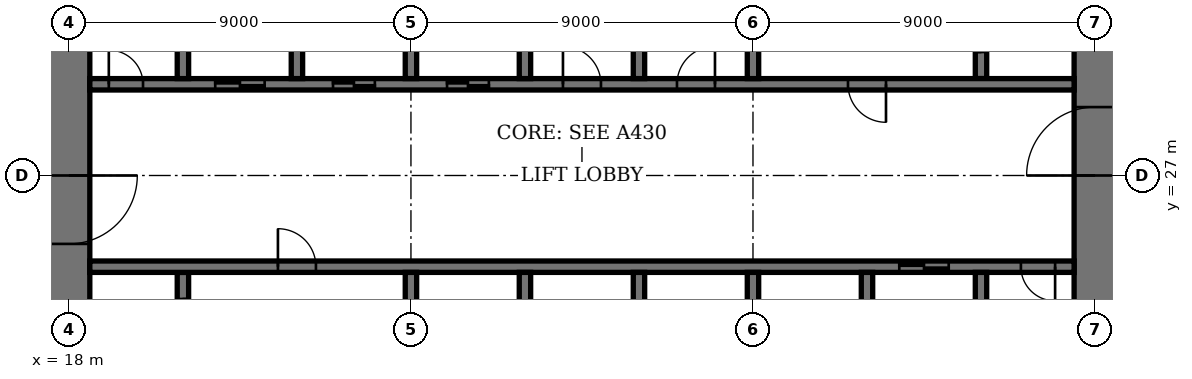
"""IFC4 building model, lengths in metres.
Left out: names, types, materials, properties, quantities, classifications, styles, units other than length and angle.
Written with IfcOpenShell. Run it as: python <this file> out.ifc"""

import sys

from ifc_helpers import new_model, si_unit, direction, frame, frame_2d, origin, place, context, subcontext, project, spatial, rectangle, extrude, element, fill, save


model = new_model("IFC4")
c1 = context("Model", 3, precision=1e-05, world=origin(), true_north=direction((0.0, 1.0)))
c2 = subcontext(c1, "Body", "Model", "MODEL_VIEW")
j1 = project(units=[si_unit("LENGTHUNIT", "METRE"), si_unit("PLANEANGLEUNIT", "RADIAN")], contexts=[c1])
p1 = place(None, origin())
s1 = spatial("IfcSite", under=j1, at=p1, CompositionType="ELEMENT")
p2 = place(p1, origin())
s2 = spatial("IfcBuilding", under=s1, at=p2, CompositionType="ELEMENT")
p3 = place(p2, frame((0.0, 0.0, 170.2)))
s3 = spatial("IfcBuildingStorey", under=s2, at=p3, CompositionType="ELEMENT", Elevation=170.2)
p4 = place(p3, frame((18.0, 35.45, 0.0), z_axis=(0.0, 0.0, 1.0), x_axis=(0.0, -1.0, 0.0)))
e1 = element("IfcWall", 1, at=p4, inside=s3, PredefinedType="SHEAR", context=c2, shape_type="SweptSolid", body=[
    extrude(rectangle(XDim=16.9, YDim=1.1, at=frame_2d((8.45, 0.0))), origin(), (0.0, 0.0, 1.0), 4.0),
])
p5 = place(p4, frame((8.45, 0.0, 0.0)))
e2 = element("IfcOpeningElement", 2, at=p5, cuts=e1, PredefinedType="OPENING", context=c2, shape_type="SweptSolid", body=[
    extrude(rectangle(XDim=1.8, YDim=2.4, at=frame_2d((0.9, 1.2))), frame((0.0, 0.56, 0.0), z_axis=(0.0, -1.0, 0.0), x_axis=(1.0, 0.0, 0.0)), (0.0, 0.0, 1.0), 1.12),
])
p6 = place(p3, frame((45.0, 18.55, 0.0), z_axis=(0.0, 0.0, 1.0), x_axis=(0.0, 1.0, 0.0)))
e3 = element("IfcWall", 3, at=p6, inside=s3, PredefinedType="SHEAR", context=c2, shape_type="SweptSolid", body=[
    extrude(rectangle(XDim=16.9, YDim=1.1, at=frame_2d((8.45, 0.0))), origin(), (0.0, 0.0, 1.0), 4.0),
])
p7 = place(p6, frame((8.45, 0.0, 0.0)))
e4 = element("IfcOpeningElement", 4, at=p7, cuts=e3, PredefinedType="OPENING", context=c2, shape_type="SweptSolid", body=[
    extrude(rectangle(XDim=1.8, YDim=2.4, at=frame_2d((0.9, 1.2))), frame((0.0, 0.56, 0.0), z_axis=(0.0, -1.0, 0.0), x_axis=(1.0, 0.0, 0.0)), (0.0, 0.0, 1.0), 1.12),
])
p8 = place(p3, frame((21.0, 21.95, 0.0), z_axis=(0.0, 0.0, 1.0), x_axis=(0.0, 1.0, 0.0)))
e5 = element("IfcWall", 5, at=p8, inside=s3, PredefinedType="SHEAR", context=c2, shape_type="SweptSolid", body=[
    extrude(rectangle(XDim=2.5, YDim=0.3, at=frame_2d((1.25, 0.0))), origin(), (0.0, 0.0, 1.0), 4.0),
])
p9 = place(p8, frame((0.7, 0.0, 0.0)))
e6 = element("IfcOpeningElement", 6, at=p9, cuts=e5, PredefinedType="OPENING", context=c2, shape_type="SweptSolid", body=[
    extrude(rectangle(XDim=1.1, YDim=2.4, at=frame_2d((0.55, 1.2))), frame((0.0, 0.16, 0.0), z_axis=(0.0, -1.0, 0.0), x_axis=(1.0, 0.0, 0.0)), (0.0, 0.0, 1.0), 0.32),
])
p10 = place(p3, frame((42.0, 29.55, 0.0), z_axis=(0.0, 0.0, 1.0), x_axis=(0.0, 1.0, 0.0)))
e7 = element("IfcWall", 7, at=p10, inside=s3, PredefinedType="SHEAR", context=c2, shape_type="SweptSolid", body=[
    extrude(rectangle(XDim=2.5, YDim=0.3, at=frame_2d((1.25, 0.0))), origin(), (0.0, 0.0, 1.0), 4.0),
])
p11 = place(p10, frame((0.7, 0.0, 0.0)))
e8 = element("IfcOpeningElement", 8, at=p11, cuts=e7, PredefinedType="OPENING", context=c2, shape_type="SweptSolid", body=[
    extrude(rectangle(XDim=1.1, YDim=2.4, at=frame_2d((0.55, 1.2))), frame((0.0, 0.16, 0.0), z_axis=(0.0, -1.0, 0.0), x_axis=(1.0, 0.0, 0.0)), (0.0, 0.0, 1.0), 0.32),
])
p12 = place(p3, frame((18.55, 24.6, 0.0), z_axis=(0.0, 0.0, 1.0), x_axis=(1.0, 0.0, 0.0)))
e9 = element("IfcWall", 9, at=p12, inside=s3, PredefinedType="SHEAR", context=c2, shape_type="SweptSolid", body=[
    extrude(rectangle(XDim=25.9, YDim=0.3, at=frame_2d((12.95, 0.0))), origin(), (0.0, 0.0, 1.0), 4.0),
])
p13 = place(p12, frame((4.95, 0.0, 0.0)))
e10 = element("IfcOpeningElement", 10, at=p13, cuts=e9, PredefinedType="OPENING", context=c2, shape_type="SweptSolid", body=[
    extrude(rectangle(XDim=1.0, YDim=2.4, at=frame_2d((0.5, 1.2))), frame((0.0, 0.16, 0.0), z_axis=(0.0, -1.0, 0.0), x_axis=(1.0, 0.0, 0.0)), (0.0, 0.0, 1.0), 0.32),
])
p14 = place(p12, frame((24.5, 0.0, 0.0)))
e11 = element("IfcOpeningElement", 11, at=p14, cuts=e9, PredefinedType="OPENING", context=c2, shape_type="SweptSolid", body=[
    extrude(rectangle(XDim=0.9, YDim=2.1, at=frame_2d((0.45, 1.05))), frame((0.0, 0.16, 0.0), z_axis=(0.0, -1.0, 0.0), x_axis=(1.0, 0.0, 0.0)), (0.0, 0.0, 1.0), 0.32),
])
p15 = place(p12, frame((21.3, 0.0, 0.0)))
e12 = element("IfcOpeningElement", 12, at=p15, cuts=e9, PredefinedType="OPENING", context=c2, shape_type="SweptSolid", body=[
    extrude(rectangle(XDim=1.3, YDim=2.4, at=frame_2d((0.65, 1.2))), frame((0.0, 0.16, 0.0), z_axis=(0.0, -1.0, 0.0), x_axis=(1.0, 0.0, 0.0)), (0.0, 0.0, 1.0), 0.32),
])
p16 = place(p3, frame((18.55, 29.4, 0.0), z_axis=(0.0, 0.0, 1.0), x_axis=(1.0, 0.0, 0.0)))
e13 = element("IfcWall", 13, at=p16, inside=s3, PredefinedType="SHEAR", context=c2, shape_type="SweptSolid", body=[
    extrude(rectangle(XDim=25.9, YDim=0.3, at=frame_2d((12.95, 0.0))), origin(), (0.0, 0.0, 1.0), 4.0),
])
p17 = place(p16, frame((19.95, 0.0, 0.0)))
e14 = element("IfcOpeningElement", 14, at=p17, cuts=e13, PredefinedType="OPENING", context=c2, shape_type="SweptSolid", body=[
    extrude(rectangle(XDim=1.0, YDim=2.4, at=frame_2d((0.5, 1.2))), frame((0.0, 0.16, 0.0), z_axis=(0.0, -1.0, 0.0), x_axis=(1.0, 0.0, 0.0)), (0.0, 0.0, 1.0), 0.32),
])
p18 = place(p16, frame((0.5, 0.0, 0.0)))
e15 = element("IfcOpeningElement", 15, at=p18, cuts=e13, PredefinedType="OPENING", context=c2, shape_type="SweptSolid", body=[
    extrude(rectangle(XDim=0.9, YDim=2.1, at=frame_2d((0.45, 1.05))), frame((0.0, 0.16, 0.0), z_axis=(0.0, -1.0, 0.0), x_axis=(1.0, 0.0, 0.0)), (0.0, 0.0, 1.0), 0.32),
])
p19 = place(p16, frame((15.45, 0.0, 0.0)))
e16 = element("IfcOpeningElement", 16, at=p19, cuts=e13, PredefinedType="OPENING", context=c2, shape_type="SweptSolid", body=[
    extrude(rectangle(XDim=1.0, YDim=2.4, at=frame_2d((0.5, 1.2))), frame((0.0, 0.16, 0.0), z_axis=(0.0, -1.0, 0.0), x_axis=(1.0, 0.0, 0.0)), (0.0, 0.0, 1.0), 0.32),
])
p20 = place(p16, frame((12.45, 0.0, 0.0)))
e17 = element("IfcOpeningElement", 17, at=p20, cuts=e13, PredefinedType="OPENING", context=c2, shape_type="SweptSolid", body=[
    extrude(rectangle(XDim=1.0, YDim=2.4, at=frame_2d((0.5, 1.2))), frame((0.0, 0.16, 0.0), z_axis=(0.0, -1.0, 0.0), x_axis=(1.0, 0.0, 0.0)), (0.0, 0.0, 1.0), 0.32),
])
p21 = place(p16, frame((9.4, 0.0, 0.0)))
e18 = element("IfcOpeningElement", 18, at=p21, cuts=e13, PredefinedType="OPENING", context=c2, shape_type="SweptSolid", body=[
    extrude(rectangle(XDim=1.1, YDim=2.4, at=frame_2d((0.55, 1.2))), frame((0.0, 0.16, 0.0), z_axis=(0.0, -1.0, 0.0), x_axis=(1.0, 0.0, 0.0)), (0.0, 0.0, 1.0), 0.32),
])
p22 = place(p16, frame((6.4, 0.0, 0.0)))
e19 = element("IfcOpeningElement", 19, at=p22, cuts=e13, PredefinedType="OPENING", context=c2, shape_type="SweptSolid", body=[
    extrude(rectangle(XDim=1.1, YDim=2.4, at=frame_2d((0.55, 1.2))), frame((0.0, 0.16, 0.0), z_axis=(0.0, -1.0, 0.0), x_axis=(1.0, 0.0, 0.0)), (0.0, 0.0, 1.0), 0.32),
])
p23 = place(p16, frame((3.3, 0.0, 0.0)))
e20 = element("IfcOpeningElement", 20, at=p23, cuts=e13, PredefinedType="OPENING", context=c2, shape_type="SweptSolid", body=[
    extrude(rectangle(XDim=1.3, YDim=2.4, at=frame_2d((0.65, 1.2))), frame((0.0, 0.16, 0.0), z_axis=(0.0, -1.0, 0.0), x_axis=(1.0, 0.0, 0.0)), (0.0, 0.0, 1.0), 0.32),
])
for number, where, z_axis, x_axis in (
    (21, (30.0, 21.75, 0.0), (0.0, 0.0, 1.0), (0.0, 1.0, 0.0)),
    (22, (33.0, 29.55, 0.0), (0.0, 0.0, 1.0), (0.0, 1.0, 0.0)),
    (23, (33.0, 21.75, 0.0), (0.0, 0.0, 1.0), (0.0, 1.0, 0.0)),
    (24, (30.0, 29.55, 0.0), (0.0, 0.0, 1.0), (0.0, 1.0, 0.0)),
    (25, (36.0, 21.75, 0.0), (0.0, 0.0, 1.0), (0.0, 1.0, 0.0)),
    (26, (27.0, 29.55, 0.0), (0.0, 0.0, 1.0), (0.0, 1.0, 0.0)),
):
    element("IfcWall", number, at=place(p3, frame(where, z_axis=z_axis, x_axis=x_axis)), inside=s3, PredefinedType="SHEAR", context=c2, shape_type="SweptSolid", body=[
        extrude(rectangle(XDim=2.7, YDim=0.3, at=frame_2d((1.35, 0.0))), origin(), (0.0, 0.0, 1.0), 4.0),
    ])
for number, where, z_axis, x_axis in (
    (27, (39.0, 18.55, 0.0), (0.0, 0.0, 1.0), (0.0, 1.0, 0.0)),
    (28, (24.0, 29.55, 0.0), (0.0, 0.0, 1.0), (0.0, 1.0, 0.0)),
):
    element("IfcWall", number, at=place(p3, frame(where, z_axis=z_axis, x_axis=x_axis)), inside=s3, PredefinedType="SHEAR", context=c2, shape_type="SweptSolid", body=[
        extrude(rectangle(XDim=5.9, YDim=0.3, at=frame_2d((2.95, 0.0))), origin(), (0.0, 0.0, 1.0), 4.0),
    ])
for number, where, z_axis, x_axis in (
    (29, (42.0, 21.75, 0.0), (0.0, 0.0, 1.0), (0.0, 1.0, 0.0)),
    (30, (21.0, 29.55, 0.0), (0.0, 0.0, 1.0), (0.0, 1.0, 0.0)),
):
    element("IfcWall", number, at=place(p3, frame(where, z_axis=z_axis, x_axis=x_axis)), inside=s3, PredefinedType="SHEAR", context=c2, shape_type="SweptSolid", body=[
        extrude(rectangle(XDim=2.7, YDim=0.3, at=frame_2d((1.35, 0.0))), origin(), (0.0, 0.0, 1.0), 4.0),
    ])
for number, where, z_axis, x_axis in (
    (31, (27.0, 21.6, 0.0), (0.0, 0.0, 1.0), (0.0, 1.0, 0.0)),
    (32, (36.0, 29.55, 0.0), (0.0, 0.0, 1.0), (0.0, 1.0, 0.0)),
):
    element("IfcWall", number, at=place(p3, frame(where, z_axis=z_axis, x_axis=x_axis)), inside=s3, PredefinedType="SHEAR", context=c2, shape_type="SweptSolid", body=[
        extrude(rectangle(XDim=2.85, YDim=0.3, at=frame_2d((1.425, 0.0))), origin(), (0.0, 0.0, 1.0), 4.0),
    ])
p24 = place(p5, origin())
e33 = element("IfcDoor", 33, at=p24, inside=s3, OperationType="DOUBLE_DOOR_DOUBLE_SWING", PredefinedType="DOOR", context=c2, shape_type="SweptSolid", body=[
    extrude(rectangle(XDim=1.8, YDim=2.4, at=frame_2d((0.9, 1.2))), frame((0.0, 0.03, 0.0), z_axis=(0.0, -1.0, 0.0), x_axis=(1.0, 0.0, 0.0)), (0.0, 0.0, 1.0), 0.06),
    extrude(rectangle(XDim=0.04, YDim=2.4, at=frame_2d((0.02, 1.2))), frame((0.0, 0.55, 0.0), z_axis=(0.0, -1.0, 0.0), x_axis=(1.0, 0.0, 0.0)), (0.0, 0.0, 1.0), 1.1),
    extrude(rectangle(XDim=0.04, YDim=2.4, at=frame_2d((1.78, 1.2))), frame((0.0, 0.55, 0.0), z_axis=(0.0, -1.0, 0.0), x_axis=(1.0, 0.0, 0.0)), (0.0, 0.0, 1.0), 1.1),
    extrude(rectangle(XDim=1.8, YDim=0.04, at=frame_2d((0.9, 2.38))), frame((0.0, 0.55, 0.0), z_axis=(0.0, -1.0, 0.0), x_axis=(1.0, 0.0, 0.0)), (0.0, 0.0, 1.0), 1.1),
])
fill(e2, e33)
p25 = place(p7, origin())
e34 = element("IfcDoor", 34, at=p25, inside=s3, OperationType="DOUBLE_DOOR_DOUBLE_SWING", PredefinedType="DOOR", context=c2, shape_type="SweptSolid", body=[
    extrude(rectangle(XDim=1.8, YDim=2.4, at=frame_2d((0.9, 1.2))), frame((0.0, 0.03, 0.0), z_axis=(0.0, -1.0, 0.0), x_axis=(1.0, 0.0, 0.0)), (0.0, 0.0, 1.0), 0.06),
    extrude(rectangle(XDim=0.04, YDim=2.4, at=frame_2d((0.02, 1.2))), frame((0.0, 0.55, 0.0), z_axis=(0.0, -1.0, 0.0), x_axis=(1.0, 0.0, 0.0)), (0.0, 0.0, 1.0), 1.1),
    extrude(rectangle(XDim=0.04, YDim=2.4, at=frame_2d((1.78, 1.2))), frame((0.0, 0.55, 0.0), z_axis=(0.0, -1.0, 0.0), x_axis=(1.0, 0.0, 0.0)), (0.0, 0.0, 1.0), 1.1),
    extrude(rectangle(XDim=1.8, YDim=0.04, at=frame_2d((0.9, 2.38))), frame((0.0, 0.55, 0.0), z_axis=(0.0, -1.0, 0.0), x_axis=(1.0, 0.0, 0.0)), (0.0, 0.0, 1.0), 1.1),
])
fill(e4, e34)
p26 = place(p13, origin())
e35 = element("IfcDoor", 35, at=p26, inside=s3, OperationType="SINGLE_SWING_RIGHT", PredefinedType="DOOR", context=c2, shape_type="SweptSolid", body=[
    extrude(rectangle(XDim=1.0, YDim=2.4, at=frame_2d((0.5, 1.2))), frame((0.0, 0.03, 0.0), z_axis=(0.0, -1.0, 0.0), x_axis=(1.0, 0.0, 0.0)), (0.0, 0.0, 1.0), 0.06),
])
fill(e10, e35)
p27 = place(p17, origin())
e36 = element("IfcDoor", 36, at=p27, inside=s3, OperationType="SINGLE_SWING_RIGHT", PredefinedType="DOOR", context=c2, shape_type="SweptSolid", body=[
    extrude(rectangle(XDim=1.0, YDim=2.4, at=frame_2d((0.5, 1.2))), frame((0.0, 0.03, 0.0), z_axis=(0.0, -1.0, 0.0), x_axis=(1.0, 0.0, 0.0)), (0.0, 0.0, 1.0), 0.06),
])
fill(e14, e36)
p28 = place(p14, origin())
e37 = element("IfcDoor", 37, at=p28, inside=s3, OperationType="SINGLE_SWING_RIGHT", PredefinedType="DOOR", context=c2, shape_type="SweptSolid", body=[
    extrude(rectangle(XDim=0.9, YDim=2.1, at=frame_2d((0.45, 1.05))), frame((0.0, 0.03, 0.0), z_axis=(0.0, -1.0, 0.0), x_axis=(1.0, 0.0, 0.0)), (0.0, 0.0, 1.0), 0.06),
])
fill(e11, e37)
p29 = place(p18, origin())
e38 = element("IfcDoor", 38, at=p29, inside=s3, OperationType="SINGLE_SWING_RIGHT", PredefinedType="DOOR", context=c2, shape_type="SweptSolid", body=[
    extrude(rectangle(XDim=0.9, YDim=2.1, at=frame_2d((0.45, 1.05))), frame((0.0, 0.03, 0.0), z_axis=(0.0, -1.0, 0.0), x_axis=(1.0, 0.0, 0.0)), (0.0, 0.0, 1.0), 0.06),
])
fill(e15, e38)
p30 = place(p19, origin())
e39 = element("IfcDoor", 39, at=p30, inside=s3, OperationType="SINGLE_SWING_LEFT", PredefinedType="DOOR", context=c2, shape_type="SweptSolid", body=[
    extrude(rectangle(XDim=1.0, YDim=2.4, at=frame_2d((0.5, 1.2))), frame((0.0, 0.03, 0.0), z_axis=(0.0, -1.0, 0.0), x_axis=(1.0, 0.0, 0.0)), (0.0, 0.0, 1.0), 0.06),
])
fill(e16, e39)
p31 = place(p20, origin())
e40 = element("IfcDoor", 40, at=p31, inside=s3, OperationType="SINGLE_SWING_RIGHT", PredefinedType="DOOR", context=c2, shape_type="SweptSolid", body=[
    extrude(rectangle(XDim=1.0, YDim=2.4, at=frame_2d((0.5, 1.2))), frame((0.0, 0.03, 0.0), z_axis=(0.0, -1.0, 0.0), x_axis=(1.0, 0.0, 0.0)), (0.0, 0.0, 1.0), 0.06),
])
fill(e17, e40)
p32 = place(p21, origin())
e41 = element("IfcDoor", 41, at=p32, inside=s3, OperationType="DOUBLE_DOOR_SLIDING", PredefinedType="DOOR", context=c2, shape_type="SweptSolid", body=[
    extrude(rectangle(XDim=1.1, YDim=2.4, at=frame_2d((0.55, 1.2))), frame((0.0, 0.02, 0.0), z_axis=(0.0, -1.0, 0.0), x_axis=(1.0, 0.0, 0.0)), (0.0, 0.0, 1.0), 0.04),
])
fill(e18, e41)
p33 = place(p22, origin())
e42 = element("IfcDoor", 42, at=p33, inside=s3, OperationType="DOUBLE_DOOR_SLIDING", PredefinedType="DOOR", context=c2, shape_type="SweptSolid", body=[
    extrude(rectangle(XDim=1.1, YDim=2.4, at=frame_2d((0.55, 1.2))), frame((0.0, 0.02, 0.0), z_axis=(0.0, -1.0, 0.0), x_axis=(1.0, 0.0, 0.0)), (0.0, 0.0, 1.0), 0.04),
])
fill(e19, e42)
p34 = place(p15, origin())
e43 = element("IfcDoor", 43, at=p34, inside=s3, OperationType="DOUBLE_DOOR_SLIDING", PredefinedType="DOOR", context=c2, shape_type="SweptSolid", body=[
    extrude(rectangle(XDim=1.3, YDim=2.4, at=frame_2d((0.65, 1.2))), frame((0.0, 0.02, 0.0), z_axis=(0.0, -1.0, 0.0), x_axis=(1.0, 0.0, 0.0)), (0.0, 0.0, 1.0), 0.04),
])
fill(e12, e43)
p35 = place(p23, origin())
e44 = element("IfcDoor", 44, at=p35, inside=s3, OperationType="DOUBLE_DOOR_SLIDING", PredefinedType="DOOR", context=c2, shape_type="SweptSolid", body=[
    extrude(rectangle(XDim=1.3, YDim=2.4, at=frame_2d((0.65, 1.2))), frame((0.0, 0.02, 0.0), z_axis=(0.0, -1.0, 0.0), x_axis=(1.0, 0.0, 0.0)), (0.0, 0.0, 1.0), 0.04),
])
fill(e20, e44)
save(model, sys.argv[1])
